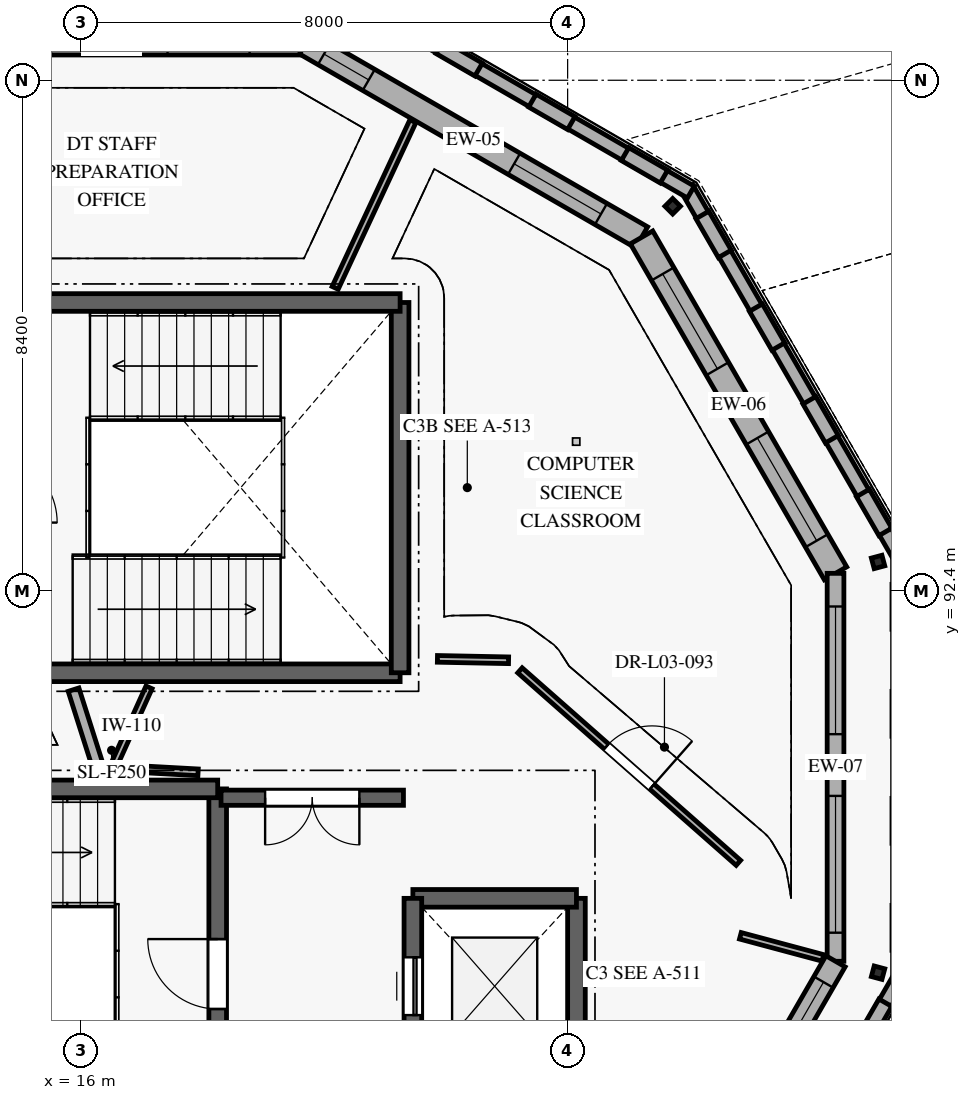
"""IFC4 building model, lengths in metres.
Left out: names, types, materials, properties, quantities, classifications, styles, units other than length and angle.
Written with IfcOpenShell. Run it as: python <this file> out.ifc"""

import sys

from ifc_helpers import new_model, si_unit, direction, frame, frame_2d, origin, origin_2d, place, context, subcontext, project, spatial, rectangle, hollow_rectangle, extrude, element, fill, save


model = new_model("IFC4")
c1 = context("Model", 3, precision=1e-05, world=origin(), true_north=direction((0.0, 1.0)))
c2 = subcontext(c1, "Body", "Model", "MODEL_VIEW")
j1 = project(units=[si_unit("LENGTHUNIT", "METRE"), si_unit("PLANEANGLEUNIT", "RADIAN")], contexts=[c1])
p1 = place(None, origin())
s1 = spatial("IfcSite", under=j1, at=p1, CompositionType="ELEMENT")
p2 = place(p1, origin())
s2 = spatial("IfcBuilding", under=s1, at=p2, CompositionType="ELEMENT")
p3 = place(p2, frame((0.0, 0.0, 12.6)))
s3 = spatial("IfcBuildingStorey", under=s2, at=p3, CompositionType="ELEMENT", Elevation=12.6)
for number, where, z_axis, x_axis in (
    (1, (29.105, 92.878, 0.0), (0.0, 0.0, 1.0), (-0.259, 0.966, 0.0)),
    (2, (25.728, 98.728, 0.0), (0.0, 0.0, 1.0), (-0.707, 0.707, 0.0)),
    (3, (29.105, 86.122, 0.0), (0.0, 0.0, 1.0), (0.259, 0.966, 0.0)),
):
    element("IfcColumn", number, at=place(p3, frame(where, z_axis=z_axis, x_axis=x_axis)), inside=s3, PredefinedType="PILASTER", context=c2, shape_type="SweptSolid", body=[
        extrude(hollow_rectangle(XDim=0.18, YDim=0.18, WallThickness=0.01, InnerFilletRadius=0.01, OuterFilletRadius=0.015, at=origin_2d()), origin(), (0.0, 0.0, 1.0), 4.2),
    ])
p4 = place(p3, frame((13.31, 101.406, 0.0), z_axis=(0.0, 0.0, 1.0), x_axis=(1.0, 0.0, 0.0)))
e4 = element("IfcWall", 4, at=p4, inside=s3, PredefinedType="SOLIDWALL", context=c2, shape_type="SweptSolid", body=[
    extrude(rectangle(XDim=6.38, YDim=0.38, at=frame_2d((3.19, 0.0))), origin(), (0.0, 0.0, 1.0), 3.94),
])
p5 = place(p4, frame((0.995, 0.0, 0.85)))
e5 = element("IfcOpeningElement", 5, at=p5, cuts=e4, PredefinedType="OPENING", context=c2, shape_type="SweptSolid", body=[
    extrude(rectangle(XDim=1.2, YDim=1.6, at=frame_2d((0.6, 0.8))), frame((0.0, 0.2, 0.0), z_axis=(0.0, -1.0, 0.0), x_axis=(1.0, 0.0, 0.0)), (0.0, 0.0, 1.0), 0.4),
])
p6 = place(p4, frame((4.11, 0.0, 0.85)))
e6 = element("IfcOpeningElement", 6, at=p6, cuts=e4, PredefinedType="OPENING", context=c2, shape_type="SweptSolid", body=[
    extrude(rectangle(XDim=1.35, YDim=1.6, at=frame_2d((0.675, 0.8))), frame((0.0, 0.2, 0.0), z_axis=(0.0, -1.0, 0.0), x_axis=(1.0, 0.0, 0.0)), (0.0, 0.0, 1.0), 0.4),
])
p7 = place(p3, frame((19.69, 101.406, 0.0), z_axis=(0.0, 0.0, 1.0), x_axis=(0.866044766488, -0.499966461314, 0.0)))
e7 = element("IfcWall", 7, at=p7, inside=s3, PredefinedType="SOLIDWALL", context=c2, shape_type="SweptSolid", body=[
    extrude(rectangle(XDim=6.38, YDim=0.4, at=frame_2d((3.19, 0.0))), origin(), (0.0, 0.0, 1.0), 3.94),
])
p8 = place(p7, frame((0.35, 0.0, 0.85)))
e8 = element("IfcOpeningElement", 8, at=p8, cuts=e7, PredefinedType="OPENING", context=c2, shape_type="SweptSolid", body=[
    extrude(rectangle(XDim=0.85, YDim=1.4, at=frame_2d((0.425, 0.7))), frame((0.0, 0.21, 0.0), z_axis=(0.0, -1.0, 0.0), x_axis=(1.0, 0.0, 0.0)), (0.0, 0.0, 1.0), 0.42),
])
p9 = place(p7, frame((3.96, 0.0, 0.85)))
e9 = element("IfcOpeningElement", 9, at=p9, cuts=e7, PredefinedType="OPENING", context=c2, shape_type="SweptSolid", body=[
    extrude(rectangle(XDim=1.65, YDim=1.6, at=frame_2d((0.825, 0.8))), frame((0.0, 0.21, 0.0), z_axis=(0.0, -1.0, 0.0), x_axis=(1.0, 0.0, 0.0)), (0.0, 0.0, 1.0), 0.42),
])
p10 = place(p3, frame((25.216, 98.216, 0.0), z_axis=(0.0, 0.0, 1.0), x_axis=(0.499966461314, -0.866044766488, 0.0)))
e10 = element("IfcWall", 10, at=p10, inside=s3, PredefinedType="SOLIDWALL", context=c2, shape_type="SweptSolid", body=[
    extrude(rectangle(XDim=6.38, YDim=0.425, at=frame_2d((3.19, 0.0))), origin(), (0.0, 0.0, 1.0), 3.94),
])
p11 = place(p10, frame((0.695, 0.0, 0.85)))
e11 = element("IfcOpeningElement", 11, at=p11, cuts=e10, PredefinedType="OPENING", context=c2, shape_type="SweptSolid", body=[
    extrude(rectangle(XDim=1.8, YDim=1.6, at=frame_2d((0.9, 0.8))), frame((0.0, 0.222, 0.0), z_axis=(0.0, -1.0, 0.0), x_axis=(1.0, 0.0, 0.0)), (0.0, 0.0, 1.0), 0.445),
])
p12 = place(p10, frame((3.81, 0.0, 0.85)))
e12 = element("IfcOpeningElement", 12, at=p12, cuts=e10, PredefinedType="OPENING", context=c2, shape_type="SweptSolid", body=[
    extrude(rectangle(XDim=1.95, YDim=1.6, at=frame_2d((0.975, 0.8))), frame((0.0, 0.222, 0.0), z_axis=(0.0, -1.0, 0.0), x_axis=(1.0, 0.0, 0.0)), (0.0, 0.0, 1.0), 0.445),
])
p13 = place(p3, frame((28.406, 92.69, 0.0), z_axis=(0.0, 0.0, 1.0), x_axis=(0.0, -1.0, 0.0)))
e13 = element("IfcWall", 13, at=p13, inside=s3, PredefinedType="SOLIDWALL", context=c2, shape_type="SweptSolid", body=[
    extrude(rectangle(XDim=6.38, YDim=0.275, at=frame_2d((3.19, 0.0))), origin(), (0.0, 0.0, 1.0), 3.94),
])
p14 = place(p13, frame((0.545, 0.0, 0.85)))
e14 = element("IfcOpeningElement", 14, at=p14, cuts=e13, PredefinedType="OPENING", context=c2, shape_type="SweptSolid", body=[
    extrude(rectangle(XDim=2.1, YDim=1.6, at=frame_2d((1.05, 0.8))), frame((0.0, 0.147, 0.0), z_axis=(0.0, -1.0, 0.0), x_axis=(1.0, 0.0, 0.0)), (0.0, 0.0, 1.0), 0.295),
])
p15 = place(p13, frame((3.66, 0.0, 0.85)))
e15 = element("IfcOpeningElement", 15, at=p15, cuts=e13, PredefinedType="OPENING", context=c2, shape_type="SweptSolid", body=[
    extrude(rectangle(XDim=2.25, YDim=1.6, at=frame_2d((1.125, 0.8))), frame((0.0, 0.147, 0.0), z_axis=(0.0, -1.0, 0.0), x_axis=(1.0, 0.0, 0.0)), (0.0, 0.0, 1.0), 0.295),
])
p16 = place(p3, frame((28.406, 86.31, 0.0), z_axis=(0.0, 0.0, 1.0), x_axis=(-0.499966461314, -0.866044766488, 0.0)))
e16 = element("IfcWall", 16, at=p16, inside=s3, PredefinedType="SOLIDWALL", context=c2, shape_type="SweptSolid", body=[
    extrude(rectangle(XDim=6.38, YDim=0.365, at=frame_2d((3.19, 0.0))), origin(), (0.0, 0.0, 1.0), 3.94),
])
p17 = place(p16, frame((0.395, 0.0, 0.85)))
e17 = element("IfcOpeningElement", 17, at=p17, cuts=e16, PredefinedType="OPENING", context=c2, shape_type="SweptSolid", body=[
    extrude(rectangle(XDim=2.4, YDim=1.6, at=frame_2d((1.2, 0.8))), frame((0.0, 0.192, 0.0), z_axis=(0.0, -1.0, 0.0), x_axis=(1.0, 0.0, 0.0)), (0.0, 0.0, 1.0), 0.385),
])
p18 = place(p16, frame((4.335, 0.0, 0.85)))
e18 = element("IfcOpeningElement", 18, at=p18, cuts=e16, PredefinedType="OPENING", context=c2, shape_type="SweptSolid", body=[
    extrude(rectangle(XDim=0.9, YDim=1.6, at=frame_2d((0.45, 0.8))), frame((0.0, 0.192, 0.0), z_axis=(0.0, -1.0, 0.0), x_axis=(1.0, 0.0, 0.0)), (0.0, 0.0, 1.0), 0.385),
])
p19 = place(p3, frame((29.481, 92.93, 0.0), z_axis=(0.0, 0.0, 1.0), x_axis=(-0.500010639957, 0.866019260715, 0.0)))
e19 = element("IfcWall", 19, at=p19, inside=s3, PredefinedType="ELEMENTEDWALL", context=c2, shape_type="SweptSolid", body=[
    extrude(rectangle(XDim=7.04, YDim=0.225, at=frame_2d((3.52, 0.0))), origin(), (0.0, 0.0, 1.0), 1.09),
])
p20 = place(p3, frame((29.226, 93.372, 1.09), z_axis=(0.0, 0.0, 1.0), x_axis=(-0.500189527592, 0.865915952323, 0.0)))
e20 = element("IfcWall", 20, at=p20, inside=s3, PredefinedType="ELEMENTEDWALL", context=c2, shape_type="SweptSolid", body=[
    extrude(rectangle(XDim=0.739, YDim=0.245, at=frame_2d((0.37, 0.0))), origin(), (0.0, 0.0, 1.0), 2.85),
])
p21 = place(p3, frame((28.345, 94.896, 1.09), z_axis=(0.0, 0.0, 1.0), x_axis=(-0.499941746681, 0.866059033742, 0.0)))
e21 = element("IfcWall", 21, at=p21, inside=s3, PredefinedType="ELEMENTEDWALL", context=c2, shape_type="SweptSolid", body=[
    extrude(rectangle(XDim=0.739, YDim=0.245, at=frame_2d((0.369, 0.0))), origin(), (0.0, 0.0, 1.0), 2.85),
])
for number, where, z_axis, x_axis in (
    (22, (27.466, 96.42, 1.09), (0.0, 0.0, 1.0), (-0.5, 0.866, 0.0)),
    (23, (26.585, 97.945, 1.09), (0.0, 0.0, 1.0), (-0.5, 0.866, 0.0)),
):
    element("IfcWall", number, at=place(p3, frame(where, z_axis=z_axis, x_axis=x_axis)), inside=s3, PredefinedType="ELEMENTEDWALL", context=c2, shape_type="SweptSolid", body=[
        extrude(rectangle(XDim=0.739, YDim=0.245, at=frame_2d((0.37, 0.0))), origin(), (0.0, 0.0, 1.0), 2.85),
    ])
p22 = place(p3, frame((26.027, 98.961, 0.0), z_axis=(0.0, 0.0, 1.0), x_axis=(-0.866019260715, 0.500010639957, 0.0)))
e24 = element("IfcWall", 24, at=p22, inside=s3, PredefinedType="ELEMENTEDWALL", context=c2, shape_type="SweptSolid", body=[
    extrude(rectangle(XDim=7.04, YDim=0.225, at=frame_2d((3.52, 0.0))), origin(), (0.0, 0.0, 1.0), 1.09),
])
for number, where, z_axis, x_axis in (
    (25, (25.585, 99.216, 1.09), (0.0, 0.0, 1.0), (-0.866, 0.5, 0.0)),
    (26, (24.06, 100.096, 1.09), (0.0, 0.0, 1.0), (-0.866, 0.5, 0.0)),
):
    element("IfcWall", number, at=place(p3, frame(where, z_axis=z_axis, x_axis=x_axis)), inside=s3, PredefinedType="ELEMENTEDWALL", context=c2, shape_type="SweptSolid", body=[
        extrude(rectangle(XDim=0.739, YDim=0.245, at=frame_2d((0.37, 0.0))), origin(), (0.0, 0.0, 1.0), 2.85),
    ])
p23 = place(p3, frame((22.536, 100.976, 1.09), z_axis=(0.0, 0.0, 1.0), x_axis=(-0.866059033742, 0.499941746681, 0.0)))
e27 = element("IfcWall", 27, at=p23, inside=s3, PredefinedType="ELEMENTEDWALL", context=c2, shape_type="SweptSolid", body=[
    extrude(rectangle(XDim=0.739, YDim=0.245, at=frame_2d((0.369, 0.0))), origin(), (0.0, 0.0, 1.0), 2.85),
])
p24 = place(p3, frame((25.961, 79.973, 0.0), z_axis=(0.0, 0.0, 1.0), x_axis=(0.500010639957, 0.866019260715, 0.0)))
e28 = element("IfcWall", 28, at=p24, inside=s3, PredefinedType="ELEMENTEDWALL", context=c2, shape_type="SweptSolid", body=[
    extrude(rectangle(XDim=7.04, YDim=0.225, at=frame_2d((3.52, 0.0))), origin(), (0.0, 0.0, 1.0), 1.09),
])
p25 = place(p3, frame((28.856, 84.988, 1.09), z_axis=(0.0, 0.0, 1.0), x_axis=(0.500189527592, 0.865915952323, 0.0)))
e29 = element("IfcWall", 29, at=p25, inside=s3, PredefinedType="ELEMENTEDWALL", context=c2, shape_type="SweptSolid", body=[
    extrude(rectangle(XDim=0.739, YDim=0.245, at=frame_2d((0.37, 0.0))), origin(), (0.0, 0.0, 1.0), 2.85),
])
p26 = place(p3, frame((18.245, 83.055, 0.0), z_axis=(0.0, 0.0, 1.0), x_axis=(0.0, 1.0, 0.0)))
e30 = element("IfcWall", 30, at=p26, inside=s3, PredefinedType="SHEAR", context=c2, shape_type="SweptSolid", body=[
    extrude(rectangle(XDim=6.09, YDim=0.29, at=frame_2d((3.045, 0.0))), origin(), (0.0, 0.0, 1.0), 3.95),
])
p27 = place(p26, frame((2.47, 0.0, 0.0)))
e31 = element("IfcOpeningElement", 31, at=p27, cuts=e30, PredefinedType="OPENING", context=c2, shape_type="SweptSolid", body=[
    extrude(rectangle(XDim=1.15, YDim=2.1, at=frame_2d((0.575, 1.05))), frame((0.0, 0.155, 0.0), z_axis=(0.0, -1.0, 0.0), x_axis=(1.0, 0.0, 0.0)), (0.0, 0.0, 1.0), 0.31),
])
p28 = place(p3, frame((18.245, 89.145, 0.0), z_axis=(0.0, 0.0, 1.0), x_axis=(-1.0, 0.0, 0.0)))
e32 = element("IfcWall", 32, at=p28, inside=s3, PredefinedType="SHEAR", context=c2, shape_type="SweptSolid", body=[
    extrude(rectangle(XDim=6.79, YDim=0.29, at=frame_2d((3.395, 0.0))), origin(), (0.0, 0.0, 1.0), 3.95),
])
p29 = place(p3, frame((24.145, 84.455, 0.0), z_axis=(0.0, 0.0, 1.0), x_axis=(0.0, 1.0, 0.0)))
e33 = element("IfcWall", 33, at=p29, inside=s3, PredefinedType="SHEAR", context=c2, shape_type="SweptSolid", body=[
    extrude(rectangle(XDim=2.89, YDim=0.29, at=frame_2d((1.445, 0.0))), origin(), (0.0, 0.0, 1.0), 3.95),
])
p30 = place(p3, frame((24.145, 87.345, 0.0), z_axis=(0.0, 0.0, 1.0), x_axis=(-1.0, 0.0, 0.0)))
e34 = element("IfcWall", 34, at=p30, inside=s3, PredefinedType="SHEAR", context=c2, shape_type="SweptSolid", body=[
    extrude(rectangle(XDim=2.69, YDim=0.29, at=frame_2d((1.345, 0.0))), origin(), (0.0, 0.0, 1.0), 3.95),
])
p31 = place(p3, frame((21.455, 87.345, 0.0), z_axis=(0.0, 0.0, 1.0), x_axis=(0.0, -1.0, 0.0)))
e35 = element("IfcWall", 35, at=p31, inside=s3, PredefinedType="SHEAR", context=c2, shape_type="SweptSolid", body=[
    extrude(rectangle(XDim=2.89, YDim=0.29, at=frame_2d((1.445, 0.0))), origin(), (0.0, 0.0, 1.0), 3.95),
])
p32 = place(p31, frame((0.97, 0.0, 0.0)))
e36 = element("IfcOpeningElement", 36, at=p32, cuts=e35, PredefinedType="OPENING", context=c2, shape_type="SweptSolid", body=[
    extrude(rectangle(XDim=0.95, YDim=2.1, at=frame_2d((0.475, 1.05))), frame((0.0, 0.155, 0.0), z_axis=(0.0, -1.0, 0.0), x_axis=(1.0, 0.0, 0.0)), (0.0, 0.0, 1.0), 0.31),
])
p33 = place(p3, frame((21.3, 89.0, 0.0), z_axis=(0.0, 0.0, 1.0), x_axis=(-1.0, 0.0, 0.0)))
e37 = element("IfcWall", 37, at=p33, inside=s3, PredefinedType="SHEAR", context=c2, shape_type="SweptSolid", body=[
    extrude(rectangle(XDim=3.0, YDim=0.25, at=frame_2d((1.5, 0.0))), origin(), (0.0, 0.0, 1.0), 3.95),
])
p34 = place(p33, frame((0.725, 0.0, 0.0)))
e38 = element("IfcOpeningElement", 38, at=p34, cuts=e37, PredefinedType="OPENING", context=c2, shape_type="SweptSolid", body=[
    extrude(rectangle(XDim=1.55, YDim=2.15, at=frame_2d((0.775, 1.075))), frame((0.0, 0.135, 0.0), z_axis=(0.0, -1.0, 0.0), x_axis=(1.0, 0.0, 0.0)), (0.0, 0.0, 1.0), 0.27),
])
p35 = place(p3, frame((14.455, 91.055, 0.0), z_axis=(0.0, 0.0, 1.0), x_axis=(1.0, 0.0, 0.0)))
e39 = element("IfcWall", 39, at=p35, inside=s3, PredefinedType="SHEAR", context=c2, shape_type="SweptSolid", body=[
    extrude(rectangle(XDim=6.79, YDim=0.29, at=frame_2d((3.395, 0.0))), origin(), (0.0, 0.0, 1.0), 3.95),
])
p36 = place(p3, frame((21.245, 91.055, 0.0), z_axis=(0.0, 0.0, 1.0), x_axis=(0.0, 1.0, 0.0)))
e40 = element("IfcWall", 40, at=p36, inside=s3, PredefinedType="SHEAR", context=c2, shape_type="SweptSolid", body=[
    extrude(rectangle(XDim=6.09, YDim=0.29, at=frame_2d((3.045, 0.0))), origin(), (0.0, 0.0, 1.0), 3.95),
])
p37 = place(p3, frame((21.245, 97.145, 0.0), z_axis=(0.0, 0.0, 1.0), x_axis=(-1.0, 0.0, 0.0)))
e41 = element("IfcWall", 41, at=p37, inside=s3, PredefinedType="SHEAR", context=c2, shape_type="SweptSolid", body=[
    extrude(rectangle(XDim=6.79, YDim=0.29, at=frame_2d((3.395, 0.0))), origin(), (0.0, 0.0, 1.0), 3.95),
])
p38 = place(p3, frame((16.305, 89.423, 0.0), z_axis=(0.0, 0.0, 1.0), x_axis=(-0.302905959506, 0.953020450828, 0.0)))
e42 = element("IfcWall", 42, at=p38, inside=s3, PredefinedType="PARTITIONING", context=c2, shape_type="SweptSolid", body=[
    extrude(rectangle(XDim=1.422, YDim=0.185, at=frame_2d((0.711, 0.0))), origin(), (0.0, 0.0, 1.0), 3.94),
])
p39 = place(p3, frame((17.115, 90.815, 0.0), z_axis=(0.0, 0.0, 1.0), x_axis=(-0.411341379463, -0.911481359953, 0.0)))
e43 = element("IfcWall", 43, at=p39, inside=s3, PredefinedType="PARTITIONING", context=c2, shape_type="SweptSolid", body=[
    extrude(rectangle(XDim=1.413, YDim=0.11, at=frame_2d((0.707, 0.0))), origin(), (0.0, 0.0, 1.0), 3.94),
])
p40 = place(p3, frame((16.787, 89.48, 0.0), z_axis=(0.0, 0.0, 1.0), x_axis=(0.998488626458, -0.054958737556, 0.0)))
e44 = element("IfcWall", 44, at=p40, inside=s3, PredefinedType="PARTITIONING", context=c2, shape_type="SweptSolid", body=[
    extrude(rectangle(XDim=1.137, YDim=0.11, at=frame_2d((0.569, 0.0))), origin(), (0.0, 0.0, 1.0), 3.94),
])
p41 = place(p3, frame((21.859, 91.284, 0.0), z_axis=(0.0, 0.0, 1.0), x_axis=(0.999803630326, -0.019816679508, 0.0)))
e45 = element("IfcWall", 45, at=p41, inside=s3, PredefinedType="PARTITIONING", context=c2, shape_type="SweptSolid", body=[
    extrude(rectangle(XDim=1.17, YDim=0.11, at=frame_2d((0.585, 0.0))), origin(), (0.0, 0.0, 1.0), 3.94),
])
p42 = place(p3, frame((23.216, 91.095, 0.0), z_axis=(0.0, 0.0, 1.0), x_axis=(0.750168084645, -0.661247188864, 0.0)))
e46 = element("IfcWall", 46, at=p42, inside=s3, PredefinedType="PARTITIONING", context=c2, shape_type="SweptSolid", body=[
    extrude(rectangle(XDim=4.788, YDim=0.11, at=frame_2d((2.394, 0.0))), origin(), (0.0, 0.0, 1.0), 3.94),
])
p43 = place(p42, frame((1.894, 0.0, 0.0)))
e47 = element("IfcOpeningElement", 47, at=p43, cuts=e46, PredefinedType="OPENING", context=c2, shape_type="SweptSolid", body=[
    extrude(rectangle(XDim=1.0, YDim=2.1, at=frame_2d((0.5, 1.05))), frame((0.0, 0.065, 0.0), z_axis=(0.0, -1.0, 0.0), x_axis=(1.0, 0.0, 0.0)), (0.0, 0.0, 1.0), 0.13),
])
p44 = place(p3, frame((26.841, 86.729, 0.0), z_axis=(0.0, 0.0, 1.0), x_axis=(0.965928668743, -0.258808436689, 0.0)))
e48 = element("IfcWall", 48, at=p44, inside=s3, PredefinedType="PARTITIONING", context=c2, shape_type="SweptSolid", body=[
    extrude(rectangle(XDim=1.406, YDim=0.11, at=frame_2d((0.703, 0.0))), origin(), (0.0, 0.0, 1.0), 3.94),
])
p45 = place(p3, frame((21.455, 100.127, 0.0), z_axis=(0.0, 0.0, 1.0), x_axis=(-0.422611546557, -0.906310918348, 0.0)))
e49 = element("IfcWall", 49, at=p45, inside=s3, PredefinedType="PARTITIONING", context=c2, shape_type="SweptSolid", body=[
    extrude(rectangle(XDim=3.025, YDim=0.11, at=frame_2d((1.513, 0.0))), origin(), (0.0, 0.0, 1.0), 3.94),
])
p46 = place(p8, origin())
e50 = element("IfcWindow", 50, at=p46, inside=s3, PartitioningType="SINGLE_PANEL", PredefinedType="WINDOW", context=c2, shape_type="SweptSolid", body=[
    extrude(rectangle(XDim=0.85, YDim=1.4, at=frame_2d((0.425, 0.7))), frame((0.0, 0.03, 0.0), z_axis=(0.0, -1.0, 0.0), x_axis=(1.0, 0.0, 0.0)), (0.0, 0.0, 1.0), 0.06),
])
fill(e8, e50)
p47 = place(p9, origin())
e51 = element("IfcWindow", 51, at=p47, inside=s3, PartitioningType="SINGLE_PANEL", PredefinedType="WINDOW", context=c2, shape_type="SweptSolid", body=[
    extrude(rectangle(XDim=1.65, YDim=1.6, at=frame_2d((0.825, 0.8))), frame((0.0, 0.03, 0.0), z_axis=(0.0, -1.0, 0.0), x_axis=(1.0, 0.0, 0.0)), (0.0, 0.0, 1.0), 0.06),
])
fill(e9, e51)
p48 = place(p11, origin())
e52 = element("IfcWindow", 52, at=p48, inside=s3, PartitioningType="SINGLE_PANEL", PredefinedType="WINDOW", context=c2, shape_type="SweptSolid", body=[
    extrude(rectangle(XDim=1.8, YDim=1.6, at=frame_2d((0.9, 0.8))), frame((0.0, 0.03, 0.0), z_axis=(0.0, -1.0, 0.0), x_axis=(1.0, 0.0, 0.0)), (0.0, 0.0, 1.0), 0.06),
])
fill(e11, e52)
p49 = place(p12, origin())
e53 = element("IfcWindow", 53, at=p49, inside=s3, PartitioningType="SINGLE_PANEL", PredefinedType="WINDOW", context=c2, shape_type="SweptSolid", body=[
    extrude(rectangle(XDim=1.95, YDim=1.6, at=frame_2d((0.975, 0.8))), frame((0.0, 0.03, 0.0), z_axis=(0.0, -1.0, 0.0), x_axis=(1.0, 0.0, 0.0)), (0.0, 0.0, 1.0), 0.06),
])
fill(e12, e53)
p50 = place(p14, origin())
e54 = element("IfcWindow", 54, at=p50, inside=s3, PartitioningType="SINGLE_PANEL", PredefinedType="WINDOW", context=c2, shape_type="SweptSolid", body=[
    extrude(rectangle(XDim=2.1, YDim=1.6, at=frame_2d((1.05, 0.8))), frame((0.0, 0.03, 0.0), z_axis=(0.0, -1.0, 0.0), x_axis=(1.0, 0.0, 0.0)), (0.0, 0.0, 1.0), 0.06),
])
fill(e14, e54)
p51 = place(p15, origin())
e55 = element("IfcWindow", 55, at=p51, inside=s3, PartitioningType="SINGLE_PANEL", PredefinedType="WINDOW", context=c2, shape_type="SweptSolid", body=[
    extrude(rectangle(XDim=2.25, YDim=1.6, at=frame_2d((1.125, 0.8))), frame((0.0, 0.03, 0.0), z_axis=(0.0, -1.0, 0.0), x_axis=(1.0, 0.0, 0.0)), (0.0, 0.0, 1.0), 0.06),
])
fill(e15, e55)
p52 = place(p17, origin())
e56 = element("IfcWindow", 56, at=p52, inside=s3, PartitioningType="SINGLE_PANEL", PredefinedType="WINDOW", context=c2, shape_type="SweptSolid", body=[
    extrude(rectangle(XDim=2.4, YDim=1.6, at=frame_2d((1.2, 0.8))), frame((0.0, 0.03, 0.0), z_axis=(0.0, -1.0, 0.0), x_axis=(1.0, 0.0, 0.0)), (0.0, 0.0, 1.0), 0.06),
])
fill(e17, e56)
p53 = place(p27, origin())
e57 = element("IfcDoor", 57, at=p53, inside=s3, OperationType="SINGLE_SWING_RIGHT", PredefinedType="DOOR", context=c2, shape_type="SweptSolid", body=[
    extrude(rectangle(XDim=1.15, YDim=2.1, at=frame_2d((0.575, 1.05))), frame((0.0, 0.025, 0.0), z_axis=(0.0, -1.0, 0.0), x_axis=(1.0, 0.0, 0.0)), (0.0, 0.0, 1.0), 0.05),
])
fill(e31, e57)
p54 = place(p32, frame((0.95, 0.0, 0.0), z_axis=(0.0, 0.0, 1.0), x_axis=(-1.0, 0.0, 0.0)))
e58 = element("IfcDoor", 58, at=p54, inside=s3, OperationType="SLIDING_TO_LEFT", PredefinedType="DOOR", context=c2, shape_type="SweptSolid", body=[
    extrude(rectangle(XDim=0.95, YDim=2.1, at=frame_2d((0.475, 1.05))), frame((0.0, 0.025, 0.0), z_axis=(0.0, -1.0, 0.0), x_axis=(1.0, 0.0, 0.0)), (0.0, 0.0, 1.0), 0.05),
])
fill(e36, e58)
p55 = place(p34, origin())
e59 = element("IfcDoor", 59, at=p55, inside=s3, OperationType="DOUBLE_DOOR_SINGLE_SWING", PredefinedType="DOOR", context=c2, shape_type="SweptSolid", body=[
    extrude(rectangle(XDim=1.55, YDim=2.15, at=frame_2d((0.775, 1.075))), frame((0.0, 0.025, 0.0), z_axis=(0.0, -1.0, 0.0), x_axis=(1.0, 0.0, 0.0)), (0.0, 0.0, 1.0), 0.05),
])
fill(e38, e59)
p56 = place(p43, origin())
e60 = element("IfcDoor", 60, at=p56, inside=s3, OperationType="SINGLE_SWING_RIGHT", PredefinedType="DOOR", context=c2, shape_type="SweptSolid", body=[
    extrude(rectangle(XDim=1.0, YDim=2.1, at=frame_2d((0.5, 1.05))), frame((0.0, 0.025, 0.0), z_axis=(0.0, -1.0, 0.0), x_axis=(1.0, 0.0, 0.0)), (0.0, 0.0, 1.0), 0.05),
])
fill(e47, e60)
save(model, sys.argv[1])
